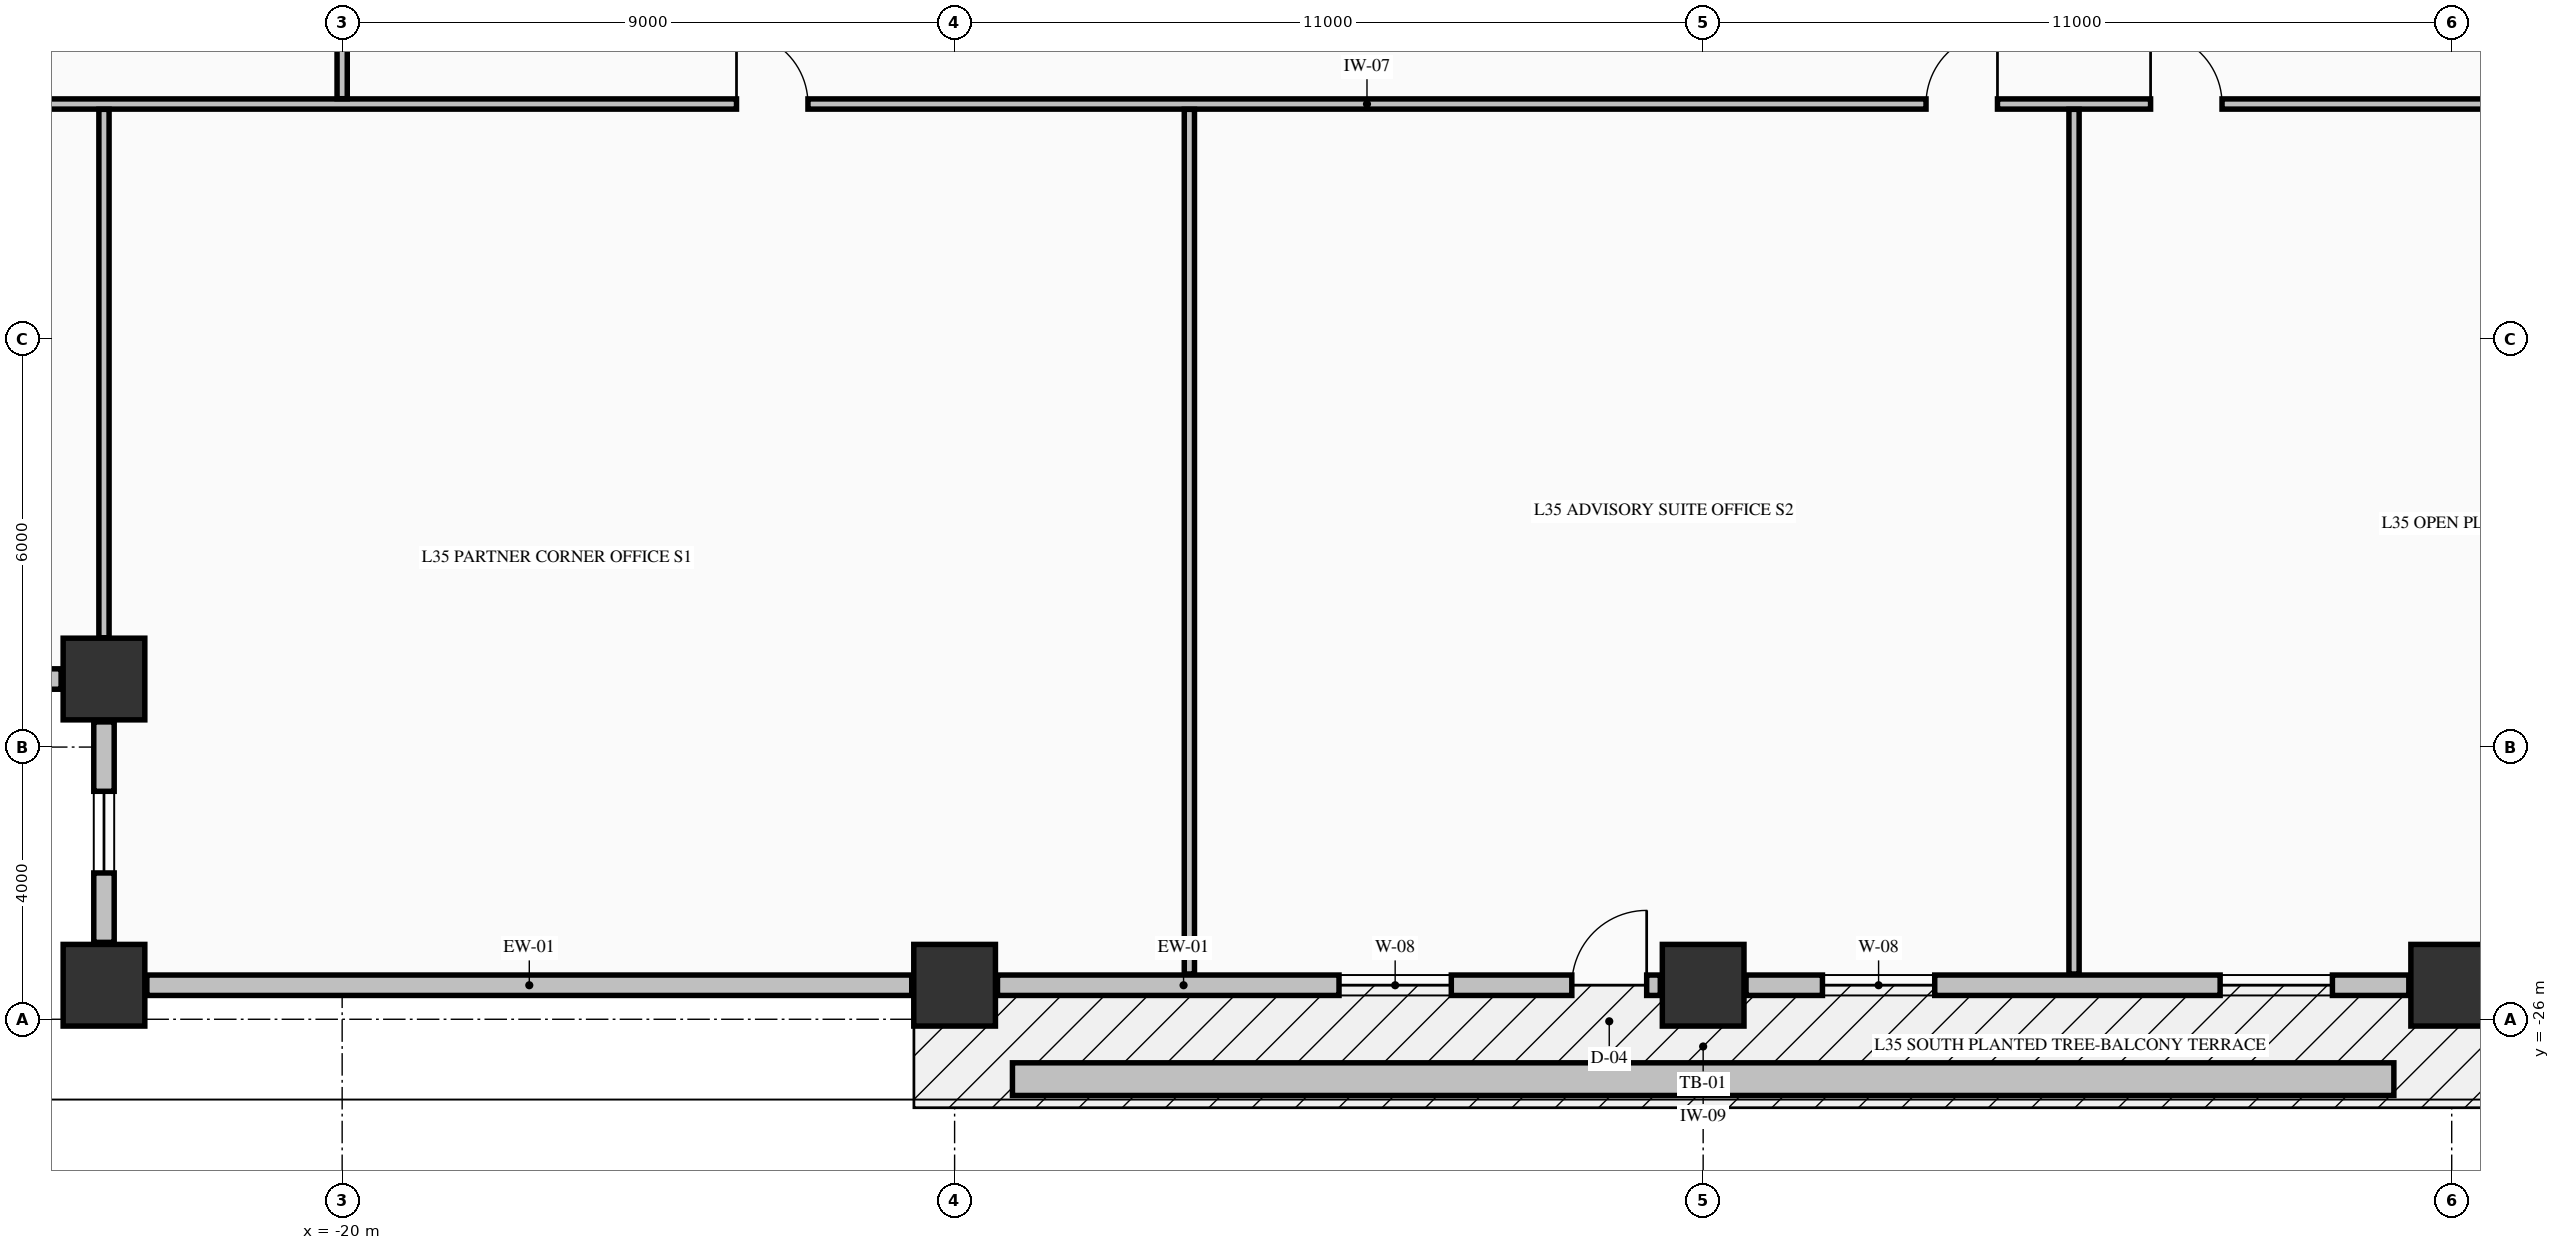
"""IFC4 building model, lengths in metres.
Left out: names, types, materials, properties, quantities, classifications, styles, units other than length and angle.
Written with IfcOpenShell. Run it as: python <this file> out.ifc"""

import sys

from ifc_helpers import new_model, si_unit, direction, frame, frame_2d, origin, origin_2d, place, context, subcontext, project, spatial, rectangle, extrude, element, fill, save


model = new_model("IFC4")
c1 = context("Model", 3, precision=1e-05, world=origin(), true_north=direction((0.0, 1.0)))
c2 = subcontext(c1, "Body", "Model", "MODEL_VIEW")
j1 = project(units=[si_unit("LENGTHUNIT", "METRE"), si_unit("PLANEANGLEUNIT", "RADIAN")], contexts=[c1])
p1 = place(None, origin())
s1 = spatial("IfcSite", under=j1, at=p1, CompositionType="ELEMENT")
p2 = place(p1, origin())
s2 = spatial("IfcBuilding", under=s1, at=p2, CompositionType="ELEMENT")
p3 = place(p2, frame((0.0, 0.0, 139.2)))
s3 = spatial("IfcBuildingStorey", under=s2, at=p3, CompositionType="ELEMENT", Elevation=139.2)
for number, where, z_axis, x_axis in (
    (1, (-23.5, -25.5, -0.25), (0.0, 0.0, 1.0), (1.0, 0.0, 0.0)),
    (2, (-11.0, -25.5, -0.25), (0.0, 0.0, 1.0), (1.0, 0.0, 0.0)),
    (3, (0.0, -25.5, -0.25), (0.0, 0.0, 1.0), (1.0, 0.0, 0.0)),
    (4, (11.0, -25.5, -0.25), (0.0, 0.0, 1.0), (1.0, 0.0, 0.0)),
    (5, (-23.5, -21.0, -0.25), (0.0, 0.0, 1.0), (1.0, 0.0, 0.0)),
):
    element("IfcColumn", number, at=place(p3, frame(where, z_axis=z_axis, x_axis=x_axis)), inside=s3, PredefinedType="COLUMN", context=c2, shape_type="SweptSolid", body=[
        extrude(rectangle(XDim=1.2, YDim=1.2, at=origin_2d()), origin(), (0.0, 0.0, 1.0), 3.495),
    ])
p4 = place(p3, frame((-27.37, -21.0, 0.0), z_axis=(0.0, 0.0, 1.0), x_axis=(1.0, 0.0, 0.0)))
e6 = element("IfcWall", 6, at=p4, inside=s3, PredefinedType="STANDARD", context=c2, shape_type="SweptSolid", body=[
    extrude(rectangle(XDim=3.24, YDim=0.3, at=frame_2d((1.62, 0.0))), origin(), (0.0, 0.0, 1.0), 2.637),
])
p5 = place(p4, frame((1.02, 0.0, 0.82)))
e7 = element("IfcOpeningElement", 7, at=p5, cuts=e6, PredefinedType="OPENING", context=c2, shape_type="SweptSolid", body=[
    extrude(rectangle(XDim=1.2, YDim=1.65, at=frame_2d((0.6, 0.825))), frame((0.0, 0.16, 0.0), z_axis=(0.0, -1.0, 0.0), x_axis=(1.0, 0.0, 0.0)), (0.0, 0.0, 1.0), 0.32),
])
p6 = place(p3, frame((-23.5, -21.63, 0.0), z_axis=(0.0, 0.0, 1.0), x_axis=(0.0, -1.0, 0.0)))
e8 = element("IfcWall", 8, at=p6, inside=s3, PredefinedType="STANDARD", context=c2, shape_type="SweptSolid", body=[
    extrude(rectangle(XDim=3.24, YDim=0.3, at=frame_2d((1.62, 0.0))), origin(), (0.0, 0.0, 1.0), 2.637),
])
p7 = place(p6, frame((1.02, 0.0, 0.82)))
e9 = element("IfcOpeningElement", 9, at=p7, cuts=e8, PredefinedType="OPENING", context=c2, shape_type="SweptSolid", body=[
    extrude(rectangle(XDim=1.2, YDim=1.65, at=frame_2d((0.6, 0.825))), frame((0.0, 0.16, 0.0), z_axis=(0.0, -1.0, 0.0), x_axis=(1.0, 0.0, 0.0)), (0.0, 0.0, 1.0), 0.32),
])
p8 = place(p3, frame((-22.87, -25.5, 0.0), z_axis=(0.0, 0.0, 1.0), x_axis=(1.0, 0.0, 0.0)))
e10 = element("IfcWall", 10, at=p8, inside=s3, PredefinedType="STANDARD", context=c2, shape_type="SweptSolid", body=[
    extrude(rectangle(XDim=11.24, YDim=0.3, at=frame_2d((5.62, 0.0))), origin(), (0.0, 0.0, 1.0), 2.637),
])
p9 = place(p3, frame((-10.37, -25.5, 0.0), z_axis=(0.0, 0.0, 1.0), x_axis=(1.0, 0.0, 0.0)))
e11 = element("IfcWall", 11, at=p9, inside=s3, PredefinedType="STANDARD", context=c2, shape_type="SweptSolid", body=[
    extrude(rectangle(XDim=9.74, YDim=0.3, at=frame_2d((4.87, 0.0))), origin(), (0.0, 0.0, 1.0), 2.637),
])
p10 = place(p9, frame((8.44, 0.0, 0.0)))
e12 = element("IfcOpeningElement", 12, at=p10, cuts=e11, PredefinedType="OPENING", context=c2, shape_type="SweptSolid", body=[
    extrude(rectangle(XDim=1.1, YDim=2.15, at=frame_2d((0.55, 1.075))), frame((0.0, 0.16, 0.0), z_axis=(0.0, -1.0, 0.0), x_axis=(1.0, 0.0, 0.0)), (0.0, 0.0, 1.0), 0.32),
])
p11 = place(p9, frame((5.019, 0.0, 0.8)))
e13 = element("IfcOpeningElement", 13, at=p11, cuts=e11, PredefinedType="OPENING", context=c2, shape_type="SweptSolid", body=[
    extrude(rectangle(XDim=1.65, YDim=1.7, at=frame_2d((0.825, 0.85))), frame((0.0, 0.16, 0.0), z_axis=(0.0, -1.0, 0.0), x_axis=(1.0, 0.0, 0.0)), (0.0, 0.0, 1.0), 0.32),
])
p12 = place(p3, frame((0.63, -25.5, 0.0), z_axis=(0.0, 0.0, 1.0), x_axis=(1.0, 0.0, 0.0)))
e14 = element("IfcWall", 14, at=p12, inside=s3, PredefinedType="STANDARD", context=c2, shape_type="SweptSolid", body=[
    extrude(rectangle(XDim=9.74, YDim=0.3, at=frame_2d((4.87, 0.0))), origin(), (0.0, 0.0, 1.0), 2.637),
])
p13 = place(p12, frame((1.123, 0.0, 0.8)))
e15 = element("IfcOpeningElement", 15, at=p13, cuts=e14, PredefinedType="OPENING", context=c2, shape_type="SweptSolid", body=[
    extrude(rectangle(XDim=1.65, YDim=1.7, at=frame_2d((0.825, 0.85))), frame((0.0, 0.16, 0.0), z_axis=(0.0, -1.0, 0.0), x_axis=(1.0, 0.0, 0.0)), (0.0, 0.0, 1.0), 0.32),
])
p14 = place(p12, frame((6.967, 0.0, 0.8)))
e16 = element("IfcOpeningElement", 16, at=p14, cuts=e14, PredefinedType="OPENING", context=c2, shape_type="SweptSolid", body=[
    extrude(rectangle(XDim=1.65, YDim=1.7, at=frame_2d((0.825, 0.85))), frame((0.0, 0.16, 0.0), z_axis=(0.0, -1.0, 0.0), x_axis=(1.0, 0.0, 0.0)), (0.0, 0.0, 1.0), 0.32),
])
p15 = place(p3, frame((-27.835, -12.55, 0.0), z_axis=(0.0, 0.0, 1.0), x_axis=(1.0, 0.0, 0.0)))
e17 = element("IfcWall", 17, at=p15, inside=s3, PredefinedType="PARTITIONING", context=c2, shape_type="SweptSolid", body=[
    extrude(rectangle(XDim=50.67, YDim=0.15, at=frame_2d((25.335, 0.0))), origin(), (0.0, 0.0, 1.0), 3.245),
])
p16 = place(p15, frame((13.63, 0.0, 0.0)))
e18 = element("IfcOpeningElement", 18, at=p16, cuts=e17, PredefinedType="OPENING", context=c2, shape_type="SweptSolid", body=[
    extrude(rectangle(XDim=1.05, YDim=2.15, at=frame_2d((0.525, 1.075))), frame((0.0, 0.085, 0.0), z_axis=(0.0, -1.0, 0.0), x_axis=(1.0, 0.0, 0.0)), (0.0, 0.0, 1.0), 0.17),
])
p17 = place(p15, frame((31.11, 0.0, 0.0)))
e19 = element("IfcOpeningElement", 19, at=p17, cuts=e17, PredefinedType="OPENING", context=c2, shape_type="SweptSolid", body=[
    extrude(rectangle(XDim=1.05, YDim=2.15, at=frame_2d((0.525, 1.075))), frame((0.0, 0.085, 0.0), z_axis=(0.0, -1.0, 0.0), x_axis=(1.0, 0.0, 0.0)), (0.0, 0.0, 1.0), 0.17),
])
p18 = place(p15, frame((34.41, 0.0, 0.0)))
e20 = element("IfcOpeningElement", 20, at=p18, cuts=e17, PredefinedType="OPENING", context=c2, shape_type="SweptSolid", body=[
    extrude(rectangle(XDim=1.05, YDim=2.15, at=frame_2d((0.525, 1.075))), frame((0.0, 0.085, 0.0), z_axis=(0.0, -1.0, 0.0), x_axis=(1.0, 0.0, 0.0)), (0.0, 0.0, 1.0), 0.17),
])
p19 = place(p3, frame((-23.5, -20.394, 0.0), z_axis=(0.0, 0.0, 1.0), x_axis=(0.0, 1.0, 0.0)))
e21 = element("IfcWall", 21, at=p19, inside=s3, PredefinedType="PARTITIONING", context=c2, shape_type="SweptSolid", body=[
    extrude(rectangle(XDim=7.766, YDim=0.15, at=frame_2d((3.883, 0.0))), origin(), (0.0, 0.0, 1.0), 3.245),
])
p20 = place(p3, frame((-20.0, -12.472, 0.0), z_axis=(0.0, 0.0, 1.0), x_axis=(0.0, 1.0, 0.0)))
e22 = element("IfcWall", 22, at=p20, inside=s3, PredefinedType="PARTITIONING", context=c2, shape_type="SweptSolid", body=[
    extrude(rectangle(XDim=2.016, YDim=0.15, at=frame_2d((1.008, 0.0))), origin(), (0.0, 0.0, 1.0), 2.735),
])
p21 = place(p20, frame((0.747, 0.0, 0.0)))
e23 = element("IfcOpeningElement", 23, at=p21, cuts=e22, PredefinedType="OPENING", context=c2, shape_type="SweptSolid", body=[
    extrude(rectangle(XDim=0.95, YDim=2.15, at=frame_2d((0.475, 1.075))), frame((0.0, 0.085, 0.0), z_axis=(0.0, -1.0, 0.0), x_axis=(1.0, 0.0, 0.0)), (0.0, 0.0, 1.0), 0.17),
])
for number, where, z_axis, x_axis in (
    (24, (-7.55, -25.335, 0.0), (0.0, 0.0, 1.0), (0.0, 1.0, 0.0)),
    (25, (5.45, -25.335, 0.0), (0.0, 0.0, 1.0), (0.0, 1.0, 0.0)),
):
    element("IfcWall", number, at=place(p3, frame(where, z_axis=z_axis, x_axis=x_axis)), inside=s3, PredefinedType="PARTITIONING", context=c2, shape_type="SweptSolid", body=[
        extrude(rectangle(XDim=12.707, YDim=0.15, at=frame_2d((6.354, 0.0))), origin(), (0.0, 0.0, 1.0), 3.245),
    ])
p22 = place(p3, frame((-10.15, -26.88, -0.04), z_axis=(0.0, 0.0, 1.0), x_axis=(1.0, 0.0, 0.0)))
e26 = element("IfcWall", 26, at=p22, inside=s3, PredefinedType="PARAPET", context=c2, shape_type="SweptSolid", body=[
    extrude(rectangle(XDim=20.3, YDim=0.48, at=frame_2d((10.15, 0.0))), origin(), (0.0, 0.0, 1.0), 0.52),
])
p23 = place(p7, origin())
e27 = element("IfcWindow", 27, at=p23, inside=s3, PartitioningType="SINGLE_PANEL", PredefinedType="WINDOW", context=c2, shape_type="SweptSolid", body=[
    extrude(rectangle(XDim=1.2, YDim=1.65, at=frame_2d((0.6, 0.825))), frame((0.0, 0.03, 0.0), z_axis=(0.0, -1.0, 0.0), x_axis=(1.0, 0.0, 0.0)), (0.0, 0.0, 1.0), 0.06),
])
fill(e9, e27)
p24 = place(p10, origin())
e28 = element("IfcDoor", 28, at=p24, inside=s3, OperationType="SINGLE_SWING_RIGHT", PredefinedType="DOOR", context=c2, shape_type="SweptSolid", body=[
    extrude(rectangle(XDim=1.1, YDim=2.15, at=frame_2d((0.55, 1.075))), frame((0.0, 0.025, 0.0), z_axis=(0.0, -1.0, 0.0), x_axis=(1.0, 0.0, 0.0)), (0.0, 0.0, 1.0), 0.05),
])
fill(e12, e28)
p25 = place(p11, origin())
e29 = element("IfcWindow", 29, at=p25, inside=s3, PartitioningType="SINGLE_PANEL", PredefinedType="WINDOW", context=c2, shape_type="SweptSolid", body=[
    extrude(rectangle(XDim=1.65, YDim=1.7, at=frame_2d((0.825, 0.85))), frame((0.0, 0.03, 0.0), z_axis=(0.0, -1.0, 0.0), x_axis=(1.0, 0.0, 0.0)), (0.0, 0.0, 1.0), 0.06),
])
fill(e13, e29)
p26 = place(p13, origin())
e30 = element("IfcWindow", 30, at=p26, inside=s3, PartitioningType="SINGLE_PANEL", PredefinedType="WINDOW", context=c2, shape_type="SweptSolid", body=[
    extrude(rectangle(XDim=1.65, YDim=1.7, at=frame_2d((0.825, 0.85))), frame((0.0, 0.03, 0.0), z_axis=(0.0, -1.0, 0.0), x_axis=(1.0, 0.0, 0.0)), (0.0, 0.0, 1.0), 0.06),
])
fill(e15, e30)
p27 = place(p14, origin())
e31 = element("IfcWindow", 31, at=p27, inside=s3, PartitioningType="SINGLE_PANEL", PredefinedType="WINDOW", context=c2, shape_type="SweptSolid", body=[
    extrude(rectangle(XDim=1.65, YDim=1.7, at=frame_2d((0.825, 0.85))), frame((0.0, 0.03, 0.0), z_axis=(0.0, -1.0, 0.0), x_axis=(1.0, 0.0, 0.0)), (0.0, 0.0, 1.0), 0.06),
])
fill(e16, e31)
p28 = place(p16, origin())
e32 = element("IfcDoor", 32, at=p28, inside=s3, OperationType="SINGLE_SWING_LEFT", PredefinedType="DOOR", context=c2, shape_type="SweptSolid", body=[
    extrude(rectangle(XDim=1.05, YDim=2.15, at=frame_2d((0.525, 1.075))), frame((0.0, 0.025, 0.0), z_axis=(0.0, -1.0, 0.0), x_axis=(1.0, 0.0, 0.0)), (0.0, 0.0, 1.0), 0.05),
])
fill(e18, e32)
p29 = place(p17, origin())
e33 = element("IfcDoor", 33, at=p29, inside=s3, OperationType="SINGLE_SWING_RIGHT", PredefinedType="DOOR", context=c2, shape_type="SweptSolid", body=[
    extrude(rectangle(XDim=1.05, YDim=2.15, at=frame_2d((0.525, 1.075))), frame((0.0, 0.025, 0.0), z_axis=(0.0, -1.0, 0.0), x_axis=(1.0, 0.0, 0.0)), (0.0, 0.0, 1.0), 0.05),
])
fill(e19, e33)
p30 = place(p18, origin())
e34 = element("IfcDoor", 34, at=p30, inside=s3, OperationType="SINGLE_SWING_LEFT", PredefinedType="DOOR", context=c2, shape_type="SweptSolid", body=[
    extrude(rectangle(XDim=1.05, YDim=2.15, at=frame_2d((0.525, 1.075))), frame((0.0, 0.025, 0.0), z_axis=(0.0, -1.0, 0.0), x_axis=(1.0, 0.0, 0.0)), (0.0, 0.0, 1.0), 0.05),
])
fill(e20, e34)
save(model, sys.argv[1])
